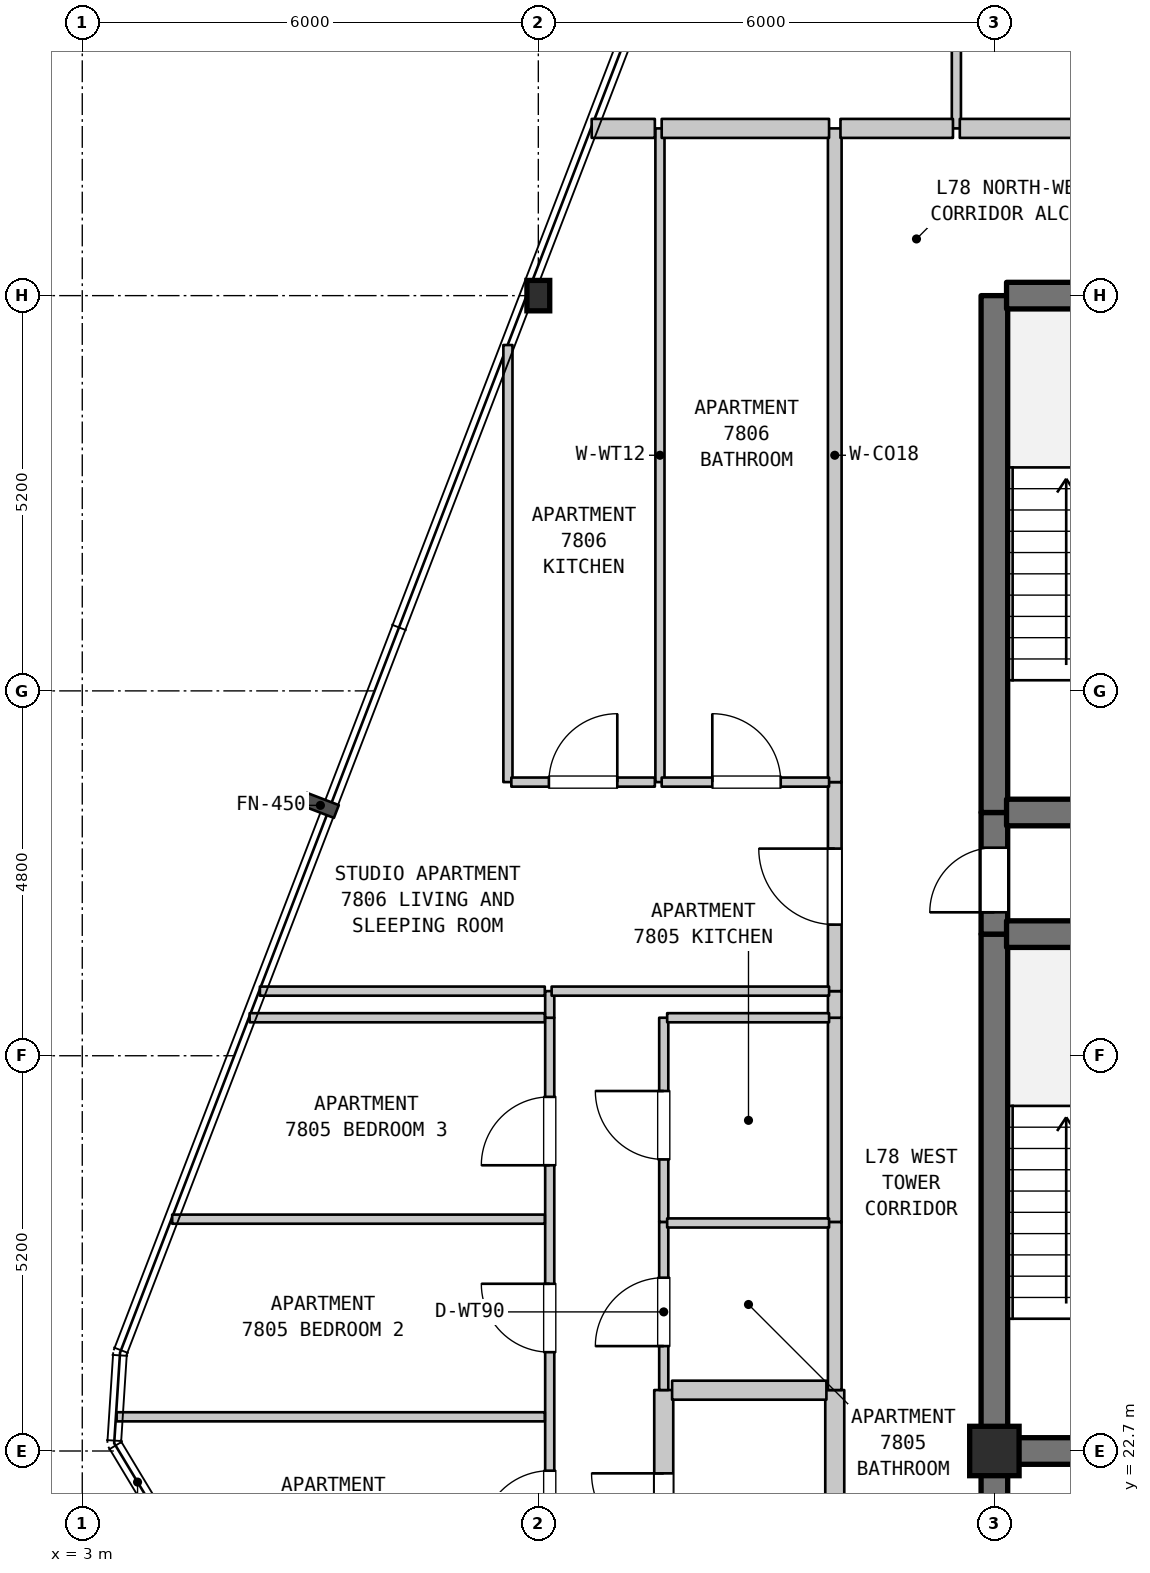
"""IFC4 building model, lengths in metres.
Left out: names, types, materials, properties, quantities, classifications, styles, units other than length and angle.
Written with IfcOpenShell. Run it as: python <this file> out.ifc"""

import sys

from ifc_helpers import new_model, si_unit, direction, frame, frame_2d, origin, origin_2d, place, context, subcontext, project, spatial, rectangle, i_section, extrude, element, fill, save


model = new_model("IFC4")
c1 = context("Model", 3, precision=1e-05, world=origin(), true_north=direction((0.0, 1.0)))
c2 = subcontext(c1, "Body", "Model", "MODEL_VIEW")
j1 = project(units=[si_unit("LENGTHUNIT", "METRE"), si_unit("PLANEANGLEUNIT", "RADIAN")], contexts=[c1])
p1 = place(None, origin())
s1 = spatial("IfcSite", under=j1, at=p1, CompositionType="ELEMENT")
p2 = place(p1, origin())
s2 = spatial("IfcBuilding", under=s1, at=p2, CompositionType="ELEMENT")
p3 = place(p2, frame((0.0, 0.0, 311.0)))
s3 = spatial("IfcBuildingStorey", under=s2, at=p3, CompositionType="ELEMENT", Elevation=311.0)
p4 = place(p3, frame((9.0, 37.9, 0.0), z_axis=(0.0, 0.0, 1.0), x_axis=(1.0, 0.0, 0.0)))
e1 = element("IfcColumn", 1, at=p4, inside=s3, PredefinedType="COLUMN", context=c2, shape_type="SweptSolid", body=[
    extrude(i_section(OverallWidth=0.3, OverallDepth=0.4, WebThickness=0.013, FlangeThickness=0.024, FilletRadius=0.027, at=origin_2d()), origin(), (0.0, 0.0, 1.0), 3.7),
])
p5 = place(p3, frame((15.0, 22.7, 0.0), z_axis=(0.0, 0.0, 1.0), x_axis=(1.0, 0.0, 0.0)))
e2 = element("IfcColumn", 2, at=p5, inside=s3, PredefinedType="COLUMN", context=c2, shape_type="SweptSolid", body=[
    extrude(rectangle(XDim=0.65, YDim=0.65, at=origin_2d()), origin(), (0.0, 0.0, 1.0), 3.7),
])
p6 = place(p3, frame((8.6, 31.5, 0.0), z_axis=(0.0, 0.0, 1.0), x_axis=(0.0, 1.0, 0.0)))
e3 = element("IfcWall", 3, at=p6, inside=s3, PredefinedType="PARTITIONING", context=c2, shape_type="SweptSolid", body=[
    extrude(rectangle(XDim=5.75, YDim=0.12, at=frame_2d((2.875, 0.0))), origin(), (0.0, 0.0, 1.0), 3.28),
])
p7 = place(p3, frame((9.15, 20.5, 0.0), z_axis=(0.0, 0.0, 1.0), x_axis=(0.0, 1.0, 0.0)))
e4 = element("IfcWall", 4, at=p7, inside=s3, PredefinedType="PARTITIONING", context=c2, shape_type="SweptSolid", body=[
    extrude(rectangle(XDim=7.9, YDim=0.12, at=frame_2d((3.95, 0.0))), origin(), (0.0, 0.0, 1.0), 2.68),
])
p8 = place(p7, frame((1.041, 0.0, 0.0)))
e5 = element("IfcOpeningElement", 5, at=p8, cuts=e4, PredefinedType="OPENING", context=c2, shape_type="SweptSolid", body=[
    extrude(rectangle(XDim=0.9, YDim=2.15, at=frame_2d((0.45, 1.075))), frame((0.0, 0.07, 0.0), z_axis=(0.0, -1.0, 0.0), x_axis=(1.0, 0.0, 0.0)), (0.0, 0.0, 1.0), 0.14),
])
p9 = place(p7, frame((3.5, 0.0, 0.0)))
e6 = element("IfcOpeningElement", 6, at=p9, cuts=e4, PredefinedType="OPENING", context=c2, shape_type="SweptSolid", body=[
    extrude(rectangle(XDim=0.9, YDim=2.15, at=frame_2d((0.45, 1.075))), frame((0.0, 0.07, 0.0), z_axis=(0.0, -1.0, 0.0), x_axis=(1.0, 0.0, 0.0)), (0.0, 0.0, 1.0), 0.14),
])
p10 = place(p7, frame((5.959, 0.0, 0.0)))
e7 = element("IfcOpeningElement", 7, at=p10, cuts=e4, PredefinedType="OPENING", context=c2, shape_type="SweptSolid", body=[
    extrude(rectangle(XDim=0.9, YDim=2.15, at=frame_2d((0.45, 1.075))), frame((0.0, 0.07, 0.0), z_axis=(0.0, -1.0, 0.0), x_axis=(1.0, 0.0, 0.0)), (0.0, 0.0, 1.0), 0.14),
])
p11 = place(p3, frame((9.15, 28.4, 0.0), z_axis=(0.0, 0.0, 1.0), x_axis=(0.0, 1.0, 0.0)))
e8 = element("IfcWall", 8, at=p11, inside=s3, PredefinedType="PARTITIONING", context=c2, shape_type="SweptSolid", body=[
    extrude(rectangle(XDim=0.35, YDim=0.12, at=frame_2d((0.175, 0.0))), origin(), (0.0, 0.0, 1.0), 3.28),
])
p12 = place(p3, frame((10.6, 31.5, 0.0), z_axis=(0.0, 0.0, 1.0), x_axis=(0.0, 1.0, 0.0)))
e9 = element("IfcWall", 9, at=p12, inside=s3, PredefinedType="PARTITIONING", context=c2, shape_type="SweptSolid", body=[
    extrude(rectangle(XDim=8.6, YDim=0.12, at=frame_2d((4.3, 0.0))), origin(), (0.0, 0.0, 1.0), 3.28),
])
p13 = place(p3, frame((10.65, 20.5, 0.0), z_axis=(0.0, 0.0, 1.0), x_axis=(0.0, 1.0, 0.0)))
e10 = element("IfcWall", 10, at=p13, inside=s3, PredefinedType="STANDARD", context=c2, shape_type="SweptSolid", body=[
    extrude(rectangle(XDim=3.002, YDim=0.25, at=frame_2d((1.501, 0.0))), origin(), (0.0, 0.0, 1.0), 3.28),
])
p14 = place(p13, frame((0.956, 0.0, 0.0)))
e11 = element("IfcOpeningElement", 11, at=p14, cuts=e10, PredefinedType="OPENING", context=c2, shape_type="SweptSolid", body=[
    extrude(rectangle(XDim=0.95, YDim=2.15, at=frame_2d((0.475, 1.075))), frame((0.0, 0.135, 0.0), z_axis=(0.0, -1.0, 0.0), x_axis=(1.0, 0.0, 0.0)), (0.0, 0.0, 1.0), 0.27),
])
p15 = place(p3, frame((10.65, 23.502, 0.0), z_axis=(0.0, 0.0, 1.0), x_axis=(0.0, 1.0, 0.0)))
e12 = element("IfcWall", 12, at=p15, inside=s3, PredefinedType="PARTITIONING", context=c2, shape_type="SweptSolid", body=[
    extrude(rectangle(XDim=2.212, YDim=0.12, at=frame_2d((1.106, 0.0))), origin(), (0.0, 0.0, 1.0), 3.28),
])
p16 = place(p15, frame((0.578, 0.0, 0.0)))
e13 = element("IfcOpeningElement", 13, at=p16, cuts=e12, PredefinedType="OPENING", context=c2, shape_type="SweptSolid", body=[
    extrude(rectangle(XDim=0.9, YDim=2.1, at=frame_2d((0.45, 1.05))), frame((0.0, 0.07, 0.0), z_axis=(0.0, -1.0, 0.0), x_axis=(1.0, 0.0, 0.0)), (0.0, 0.0, 1.0), 0.14),
])
p17 = place(p3, frame((10.65, 25.714, 0.0), z_axis=(0.0, 0.0, 1.0), x_axis=(0.0, 1.0, 0.0)))
e14 = element("IfcWall", 14, at=p17, inside=s3, PredefinedType="PARTITIONING", context=c2, shape_type="SweptSolid", body=[
    extrude(rectangle(XDim=2.686, YDim=0.12, at=frame_2d((1.343, 0.0))), origin(), (0.0, 0.0, 1.0), 3.28),
])
p18 = place(p17, frame((0.822, 0.0, 0.0)))
e15 = element("IfcOpeningElement", 15, at=p18, cuts=e14, PredefinedType="OPENING", context=c2, shape_type="SweptSolid", body=[
    extrude(rectangle(XDim=0.9, YDim=2.15, at=frame_2d((0.45, 1.075))), frame((0.0, 0.07, 0.0), z_axis=(0.0, -1.0, 0.0), x_axis=(1.0, 0.0, 0.0)), (0.0, 0.0, 1.0), 0.14),
])
p19 = place(p3, frame((12.9, 20.5, 0.0), z_axis=(0.0, 0.0, 1.0), x_axis=(0.0, 1.0, 0.0)))
e16 = element("IfcWall", 16, at=p19, inside=s3, PredefinedType="STANDARD", context=c2, shape_type="SweptSolid", body=[
    extrude(rectangle(XDim=3.002, YDim=0.25, at=frame_2d((1.501, 0.0))), origin(), (0.0, 0.0, 1.0), 3.28),
])
p20 = place(p3, frame((12.9, 23.502, 0.0), z_axis=(0.0, 0.0, 1.0), x_axis=(0.0, 1.0, 0.0)))
e17 = element("IfcWall", 17, at=p20, inside=s3, PredefinedType="STANDARD", context=c2, shape_type="SweptSolid", body=[
    extrude(rectangle(XDim=2.212, YDim=0.18, at=frame_2d((1.106, 0.0))), origin(), (0.0, 0.0, 1.0), 3.28),
])
p21 = place(p3, frame((12.9, 25.714, 0.0), z_axis=(0.0, 0.0, 1.0), x_axis=(0.0, 1.0, 0.0)))
e18 = element("IfcWall", 18, at=p21, inside=s3, PredefinedType="STANDARD", context=c2, shape_type="SweptSolid", body=[
    extrude(rectangle(XDim=2.686, YDim=0.18, at=frame_2d((1.343, 0.0))), origin(), (0.0, 0.0, 1.0), 3.28),
])
p22 = place(p3, frame((12.9, 28.4, 0.0), z_axis=(0.0, 0.0, 1.0), x_axis=(0.0, 1.0, 0.0)))
e19 = element("IfcWall", 19, at=p22, inside=s3, PredefinedType="STANDARD", context=c2, shape_type="SweptSolid", body=[
    extrude(rectangle(XDim=0.35, YDim=0.18, at=frame_2d((0.175, 0.0))), origin(), (0.0, 0.0, 1.0), 3.28),
])
p23 = place(p3, frame((12.9, 28.75, 0.0), z_axis=(0.0, 0.0, 1.0), x_axis=(0.0, 1.0, 0.0)))
e20 = element("IfcWall", 20, at=p23, inside=s3, PredefinedType="STANDARD", context=c2, shape_type="SweptSolid", body=[
    extrude(rectangle(XDim=2.75, YDim=0.18, at=frame_2d((1.375, 0.0))), origin(), (0.0, 0.0, 1.0), 3.28),
])
p24 = place(p23, frame((0.875, 0.0, 0.0)))
e21 = element("IfcOpeningElement", 21, at=p24, cuts=e20, PredefinedType="OPENING", context=c2, shape_type="SweptSolid", body=[
    extrude(rectangle(XDim=1.0, YDim=2.15, at=frame_2d((0.5, 1.075))), frame((0.0, 0.1, 0.0), z_axis=(0.0, -1.0, 0.0), x_axis=(1.0, 0.0, 0.0)), (0.0, 0.0, 1.0), 0.2),
])
p25 = place(p3, frame((12.9, 31.5, 0.0), z_axis=(0.0, 0.0, 1.0), x_axis=(0.0, 1.0, 0.0)))
e22 = element("IfcWall", 22, at=p25, inside=s3, PredefinedType="STANDARD", context=c2, shape_type="SweptSolid", body=[
    extrude(rectangle(XDim=8.6, YDim=0.18, at=frame_2d((4.3, 0.0))), origin(), (0.0, 0.0, 1.0), 3.28),
])
p26 = place(p3, frame((14.5, 40.1, 0.0), z_axis=(0.0, 0.0, 1.0), x_axis=(0.0, 1.0, 0.0)))
e23 = element("IfcWall", 23, at=p26, inside=s3, PredefinedType="PARTITIONING", context=c2, shape_type="SweptSolid", body=[
    extrude(rectangle(XDim=4.2, YDim=0.12, at=frame_2d((2.1, 0.0))), origin(), (0.0, 0.0, 1.0), 3.28),
])
p27 = place(p3, frame((15.0, 19.5, 0.0), z_axis=(0.0, 0.0, 1.0), x_axis=(0.0, 1.0, 0.0)))
e24 = element("IfcWall", 24, at=p27, inside=s3, PredefinedType="SHEAR", context=c2, shape_type="SweptSolid", body=[
    extrude(rectangle(XDim=3.2, YDim=0.35, at=frame_2d((1.6, 0.0))), origin(), (0.0, 0.0, 1.0), 3.28),
])
p28 = place(p3, frame((15.0, 22.7, 0.0), z_axis=(0.0, 0.0, 1.0), x_axis=(0.0, 1.0, 0.0)))
e25 = element("IfcWall", 25, at=p28, inside=s3, PredefinedType="SHEAR", context=c2, shape_type="SweptSolid", body=[
    extrude(rectangle(XDim=6.8, YDim=0.35, at=frame_2d((3.4, 0.0))), origin(), (0.0, 0.0, 1.0), 3.28),
])
p29 = place(p3, frame((15.0, 29.5, 0.0), z_axis=(0.0, 0.0, 1.0), x_axis=(0.0, 1.0, 0.0)))
e26 = element("IfcWall", 26, at=p29, inside=s3, PredefinedType="SHEAR", context=c2, shape_type="SweptSolid", body=[
    extrude(rectangle(XDim=1.6, YDim=0.35, at=frame_2d((0.8, 0.0))), origin(), (0.0, 0.0, 1.0), 3.28),
])
p30 = place(p29, frame((0.287, 0.0, 0.0)))
e27 = element("IfcOpeningElement", 27, at=p30, cuts=e26, PredefinedType="OPENING", context=c2, shape_type="SweptSolid", body=[
    extrude(rectangle(XDim=0.85, YDim=2.1, at=frame_2d((0.425, 1.05))), frame((0.0, 0.185, 0.0), z_axis=(0.0, -1.0, 0.0), x_axis=(1.0, 0.0, 0.0)), (0.0, 0.0, 1.0), 0.37),
])
p31 = place(p3, frame((15.0, 31.1, 0.0), z_axis=(0.0, 0.0, 1.0), x_axis=(0.0, 1.0, 0.0)))
e28 = element("IfcWall", 28, at=p31, inside=s3, PredefinedType="SHEAR", context=c2, shape_type="SweptSolid", body=[
    extrude(rectangle(XDim=6.8, YDim=0.35, at=frame_2d((3.4, 0.0))), origin(), (0.0, 0.0, 1.0), 3.28),
])
p32 = place(p3, frame((15.16, 22.7, 0.0), z_axis=(0.0, 0.0, 1.0), x_axis=(1.0, 0.0, 0.0)))
e29 = element("IfcWall", 29, at=p32, inside=s3, PredefinedType="SHEAR", context=c2, shape_type="SweptSolid", body=[
    extrude(rectangle(XDim=3.68, YDim=0.35, at=frame_2d((1.84, 0.0))), origin(), (0.0, 0.0, 1.0), 3.28),
])
p33 = place(p3, frame((3.452, 23.15, 0.0), z_axis=(0.0, 0.0, 1.0), x_axis=(1.0, 0.0, 0.0)))
e30 = element("IfcWall", 30, at=p33, inside=s3, PredefinedType="PARTITIONING", context=c2, shape_type="SweptSolid", body=[
    extrude(rectangle(XDim=5.633, YDim=0.12, at=frame_2d((2.816, 0.0))), origin(), (0.0, 0.0, 1.0), 3.28),
])
p34 = place(p3, frame((10.76, 23.5, 0.0), z_axis=(0.0, 0.0, 1.0), x_axis=(1.0, 0.0, 0.0)))
e31 = element("IfcWall", 31, at=p34, inside=s3, PredefinedType="STANDARD", context=c2, shape_type="SweptSolid", body=[
    extrude(rectangle(XDim=2.03, YDim=0.25, at=frame_2d((1.015, 0.0))), origin(), (0.0, 0.0, 1.0), 3.28),
])
p35 = place(p3, frame((10.695, 25.7, 0.0), z_axis=(0.0, 0.0, 1.0), x_axis=(1.0, 0.0, 0.0)))
e32 = element("IfcWall", 32, at=p35, inside=s3, PredefinedType="PARTITIONING", context=c2, shape_type="SweptSolid", body=[
    extrude(rectangle(XDim=2.13, YDim=0.12, at=frame_2d((1.065, 0.0))), origin(), (0.0, 0.0, 1.0), 3.28),
])
p36 = place(p3, frame((4.183, 25.75, 0.0), z_axis=(0.0, 0.0, 1.0), x_axis=(1.0, 0.0, 0.0)))
e33 = element("IfcWall", 33, at=p36, inside=s3, PredefinedType="PARTITIONING", context=c2, shape_type="SweptSolid", body=[
    extrude(rectangle(XDim=4.902, YDim=0.12, at=frame_2d((2.451, 0.0))), origin(), (0.0, 0.0, 1.0), 3.28),
])
p37 = place(p3, frame((5.202, 28.4, 0.0), z_axis=(0.0, 0.0, 1.0), x_axis=(1.0, 0.0, 0.0)))
e34 = element("IfcWall", 34, at=p37, inside=s3, PredefinedType="PARTITIONING", context=c2, shape_type="SweptSolid", body=[
    extrude(rectangle(XDim=3.883, YDim=0.12, at=frame_2d((1.941, 0.0))), origin(), (0.0, 0.0, 1.0), 3.28),
])
p38 = place(p3, frame((10.695, 28.4, 0.0), z_axis=(0.0, 0.0, 1.0), x_axis=(1.0, 0.0, 0.0)))
e35 = element("IfcWall", 35, at=p38, inside=s3, PredefinedType="PARTITIONING", context=c2, shape_type="SweptSolid", body=[
    extrude(rectangle(XDim=2.13, YDim=0.12, at=frame_2d((1.065, 0.0))), origin(), (0.0, 0.0, 1.0), 3.28),
])
p39 = place(p3, frame((5.337, 28.75, 0.0), z_axis=(0.0, 0.0, 1.0), x_axis=(1.0, 0.0, 0.0)))
e36 = element("IfcWall", 36, at=p39, inside=s3, PredefinedType="PARTITIONING", context=c2, shape_type="SweptSolid", body=[
    extrude(rectangle(XDim=3.748, YDim=0.12, at=frame_2d((1.874, 0.0))), origin(), (0.0, 0.0, 1.0), 3.28),
])
p40 = place(p3, frame((9.175, 28.75, 0.0), z_axis=(0.0, 0.0, 1.0), x_axis=(1.0, 0.0, 0.0)))
e37 = element("IfcWall", 37, at=p40, inside=s3, PredefinedType="PARTITIONING", context=c2, shape_type="SweptSolid", body=[
    extrude(rectangle(XDim=3.65, YDim=0.12, at=frame_2d((1.825, 0.0))), origin(), (0.0, 0.0, 1.0), 3.28),
])
for number, where, z_axis, x_axis in (
    (38, (15.16, 29.5, 0.0), (0.0, 0.0, 1.0), (1.0, 0.0, 0.0)),
    (39, (15.16, 31.1, 0.0), (0.0, 0.0, 1.0), (1.0, 0.0, 0.0)),
):
    element("IfcWall", number, at=place(p3, frame(where, z_axis=z_axis, x_axis=x_axis)), inside=s3, PredefinedType="SHEAR", context=c2, shape_type="SweptSolid", body=[
        extrude(rectangle(XDim=3.68, YDim=0.35, at=frame_2d((1.84, 0.0))), origin(), (0.0, 0.0, 1.0), 3.28),
    ])
p41 = place(p3, frame((8.645, 31.5, 0.0), z_axis=(0.0, 0.0, 1.0), x_axis=(1.0, 0.0, 0.0)))
e40 = element("IfcWall", 40, at=p41, inside=s3, PredefinedType="PARTITIONING", context=c2, shape_type="SweptSolid", body=[
    extrude(rectangle(XDim=1.888, YDim=0.12, at=frame_2d((0.944, 0.0))), origin(), (0.0, 0.0, 1.0), 3.28),
])
p42 = place(p41, frame((0.494, 0.0, 0.0)))
e41 = element("IfcOpeningElement", 41, at=p42, cuts=e40, PredefinedType="OPENING", context=c2, shape_type="SweptSolid", body=[
    extrude(rectangle(XDim=0.9, YDim=2.15, at=frame_2d((0.45, 1.075))), frame((0.0, 0.07, 0.0), z_axis=(0.0, -1.0, 0.0), x_axis=(1.0, 0.0, 0.0)), (0.0, 0.0, 1.0), 0.14),
])
p43 = place(p3, frame((10.623, 31.5, 0.0), z_axis=(0.0, 0.0, 1.0), x_axis=(1.0, 0.0, 0.0)))
e42 = element("IfcWall", 42, at=p43, inside=s3, PredefinedType="PARTITIONING", context=c2, shape_type="SweptSolid", body=[
    extrude(rectangle(XDim=2.202, YDim=0.12, at=frame_2d((1.101, 0.0))), origin(), (0.0, 0.0, 1.0), 3.28),
])
p44 = place(p43, frame((0.666, 0.0, 0.0)))
e43 = element("IfcOpeningElement", 43, at=p44, cuts=e42, PredefinedType="OPENING", context=c2, shape_type="SweptSolid", body=[
    extrude(rectangle(XDim=0.9, YDim=2.1, at=frame_2d((0.45, 1.05))), frame((0.0, 0.07, 0.0), z_axis=(0.0, -1.0, 0.0), x_axis=(1.0, 0.0, 0.0)), (0.0, 0.0, 1.0), 0.14),
])
p45 = place(p3, frame((15.16, 37.9, 0.0), z_axis=(0.0, 0.0, 1.0), x_axis=(1.0, 0.0, 0.0)))
e44 = element("IfcWall", 44, at=p45, inside=s3, PredefinedType="SHEAR", context=c2, shape_type="SweptSolid", body=[
    extrude(rectangle(XDim=3.68, YDim=0.35, at=frame_2d((1.84, 0.0))), origin(), (0.0, 0.0, 1.0), 3.28),
])
p46 = place(p3, frame((9.702, 40.1, 0.0), z_axis=(0.0, 0.0, 1.0), x_axis=(1.0, 0.0, 0.0)))
e45 = element("IfcWall", 45, at=p46, inside=s3, PredefinedType="STANDARD", context=c2, shape_type="SweptSolid", body=[
    extrude(rectangle(XDim=0.831, YDim=0.25, at=frame_2d((0.416, 0.0))), origin(), (0.0, 0.0, 1.0), 3.28),
])
p47 = place(p3, frame((10.623, 40.1, 0.0), z_axis=(0.0, 0.0, 1.0), x_axis=(1.0, 0.0, 0.0)))
e46 = element("IfcWall", 46, at=p47, inside=s3, PredefinedType="STANDARD", context=c2, shape_type="SweptSolid", body=[
    extrude(rectangle(XDim=2.202, YDim=0.25, at=frame_2d((1.101, 0.0))), origin(), (0.0, 0.0, 1.0), 3.28),
])
p48 = place(p3, frame((12.975, 40.1, 0.0), z_axis=(0.0, 0.0, 1.0), x_axis=(1.0, 0.0, 0.0)))
e47 = element("IfcWall", 47, at=p48, inside=s3, PredefinedType="STANDARD", context=c2, shape_type="SweptSolid", body=[
    extrude(rectangle(XDim=1.48, YDim=0.25, at=frame_2d((0.74, 0.0))), origin(), (0.0, 0.0, 1.0), 3.28),
])
p49 = place(p3, frame((14.545, 40.1, 0.0), z_axis=(0.0, 0.0, 1.0), x_axis=(1.0, 0.0, 0.0)))
e48 = element("IfcWall", 48, at=p49, inside=s3, PredefinedType="STANDARD", context=c2, shape_type="SweptSolid", body=[
    extrude(rectangle(XDim=8.495, YDim=0.25, at=frame_2d((4.248, 0.0))), origin(), (0.0, 0.0, 1.0), 3.28),
])
p50 = place(p8, origin())
e49 = element("IfcDoor", 49, at=p50, inside=s3, OperationType="SINGLE_SWING_LEFT", PredefinedType="DOOR", context=c2, shape_type="SweptSolid", body=[
    extrude(rectangle(XDim=0.9, YDim=2.15, at=frame_2d((0.45, 1.075))), frame((0.0, 0.025, 0.0), z_axis=(0.0, -1.0, 0.0), x_axis=(1.0, 0.0, 0.0)), (0.0, 0.0, 1.0), 0.05),
])
fill(e5, e49)
p51 = place(p9, origin())
e50 = element("IfcDoor", 50, at=p51, inside=s3, OperationType="SINGLE_SWING_RIGHT", PredefinedType="DOOR", context=c2, shape_type="SweptSolid", body=[
    extrude(rectangle(XDim=0.9, YDim=2.15, at=frame_2d((0.45, 1.075))), frame((0.0, 0.025, 0.0), z_axis=(0.0, -1.0, 0.0), x_axis=(1.0, 0.0, 0.0)), (0.0, 0.0, 1.0), 0.05),
])
fill(e6, e50)
p52 = place(p10, origin())
e51 = element("IfcDoor", 51, at=p52, inside=s3, OperationType="SINGLE_SWING_LEFT", PredefinedType="DOOR", context=c2, shape_type="SweptSolid", body=[
    extrude(rectangle(XDim=0.9, YDim=2.15, at=frame_2d((0.45, 1.075))), frame((0.0, 0.025, 0.0), z_axis=(0.0, -1.0, 0.0), x_axis=(1.0, 0.0, 0.0)), (0.0, 0.0, 1.0), 0.05),
])
fill(e7, e51)
p53 = place(p14, origin())
e52 = element("IfcDoor", 52, at=p53, inside=s3, OperationType="SINGLE_SWING_RIGHT", PredefinedType="DOOR", context=c2, shape_type="SweptSolid", body=[
    extrude(rectangle(XDim=0.95, YDim=2.15, at=frame_2d((0.475, 1.075))), frame((0.0, 0.025, 0.0), z_axis=(0.0, -1.0, 0.0), x_axis=(1.0, 0.0, 0.0)), (0.0, 0.0, 1.0), 0.05),
])
fill(e11, e52)
p54 = place(p16, origin())
e53 = element("IfcDoor", 53, at=p54, inside=s3, OperationType="SINGLE_SWING_LEFT", PredefinedType="DOOR", context=c2, shape_type="SweptSolid", body=[
    extrude(rectangle(XDim=0.9, YDim=2.1, at=frame_2d((0.45, 1.05))), frame((0.0, 0.025, 0.0), z_axis=(0.0, -1.0, 0.0), x_axis=(1.0, 0.0, 0.0)), (0.0, 0.0, 1.0), 0.05),
])
fill(e13, e53)
p55 = place(p18, origin())
e54 = element("IfcDoor", 54, at=p55, inside=s3, OperationType="SINGLE_SWING_RIGHT", PredefinedType="DOOR", context=c2, shape_type="SweptSolid", body=[
    extrude(rectangle(XDim=0.9, YDim=2.15, at=frame_2d((0.45, 1.075))), frame((0.0, 0.025, 0.0), z_axis=(0.0, -1.0, 0.0), x_axis=(1.0, 0.0, 0.0)), (0.0, 0.0, 1.0), 0.05),
])
fill(e15, e54)
p56 = place(p24, origin())
e55 = element("IfcDoor", 55, at=p56, inside=s3, OperationType="SINGLE_SWING_RIGHT", PredefinedType="DOOR", context=c2, shape_type="SweptSolid", body=[
    extrude(rectangle(XDim=1.0, YDim=2.15, at=frame_2d((0.5, 1.075))), frame((0.0, 0.025, 0.0), z_axis=(0.0, -1.0, 0.0), x_axis=(1.0, 0.0, 0.0)), (0.0, 0.0, 1.0), 0.05),
])
fill(e21, e55)
p57 = place(p30, origin())
e56 = element("IfcDoor", 56, at=p57, inside=s3, OperationType="SINGLE_SWING_LEFT", PredefinedType="DOOR", context=c2, shape_type="SweptSolid", body=[
    extrude(rectangle(XDim=0.85, YDim=2.1, at=frame_2d((0.425, 1.05))), frame((0.0, 0.025, 0.0), z_axis=(0.0, -1.0, 0.0), x_axis=(1.0, 0.0, 0.0)), (0.0, 0.0, 1.0), 0.05),
])
fill(e27, e56)
p58 = place(p42, origin())
e57 = element("IfcDoor", 57, at=p58, inside=s3, OperationType="SINGLE_SWING_RIGHT", PredefinedType="DOOR", context=c2, shape_type="SweptSolid", body=[
    extrude(rectangle(XDim=0.9, YDim=2.15, at=frame_2d((0.45, 1.075))), frame((0.0, 0.025, 0.0), z_axis=(0.0, -1.0, 0.0), x_axis=(1.0, 0.0, 0.0)), (0.0, 0.0, 1.0), 0.05),
])
fill(e41, e57)
p59 = place(p44, origin())
e58 = element("IfcDoor", 58, at=p59, inside=s3, OperationType="SINGLE_SWING_LEFT", PredefinedType="DOOR", context=c2, shape_type="SweptSolid", body=[
    extrude(rectangle(XDim=0.9, YDim=2.1, at=frame_2d((0.45, 1.05))), frame((0.0, 0.025, 0.0), z_axis=(0.0, -1.0, 0.0), x_axis=(1.0, 0.0, 0.0)), (0.0, 0.0, 1.0), 0.05),
])
fill(e43, e58)
save(model, sys.argv[1])
